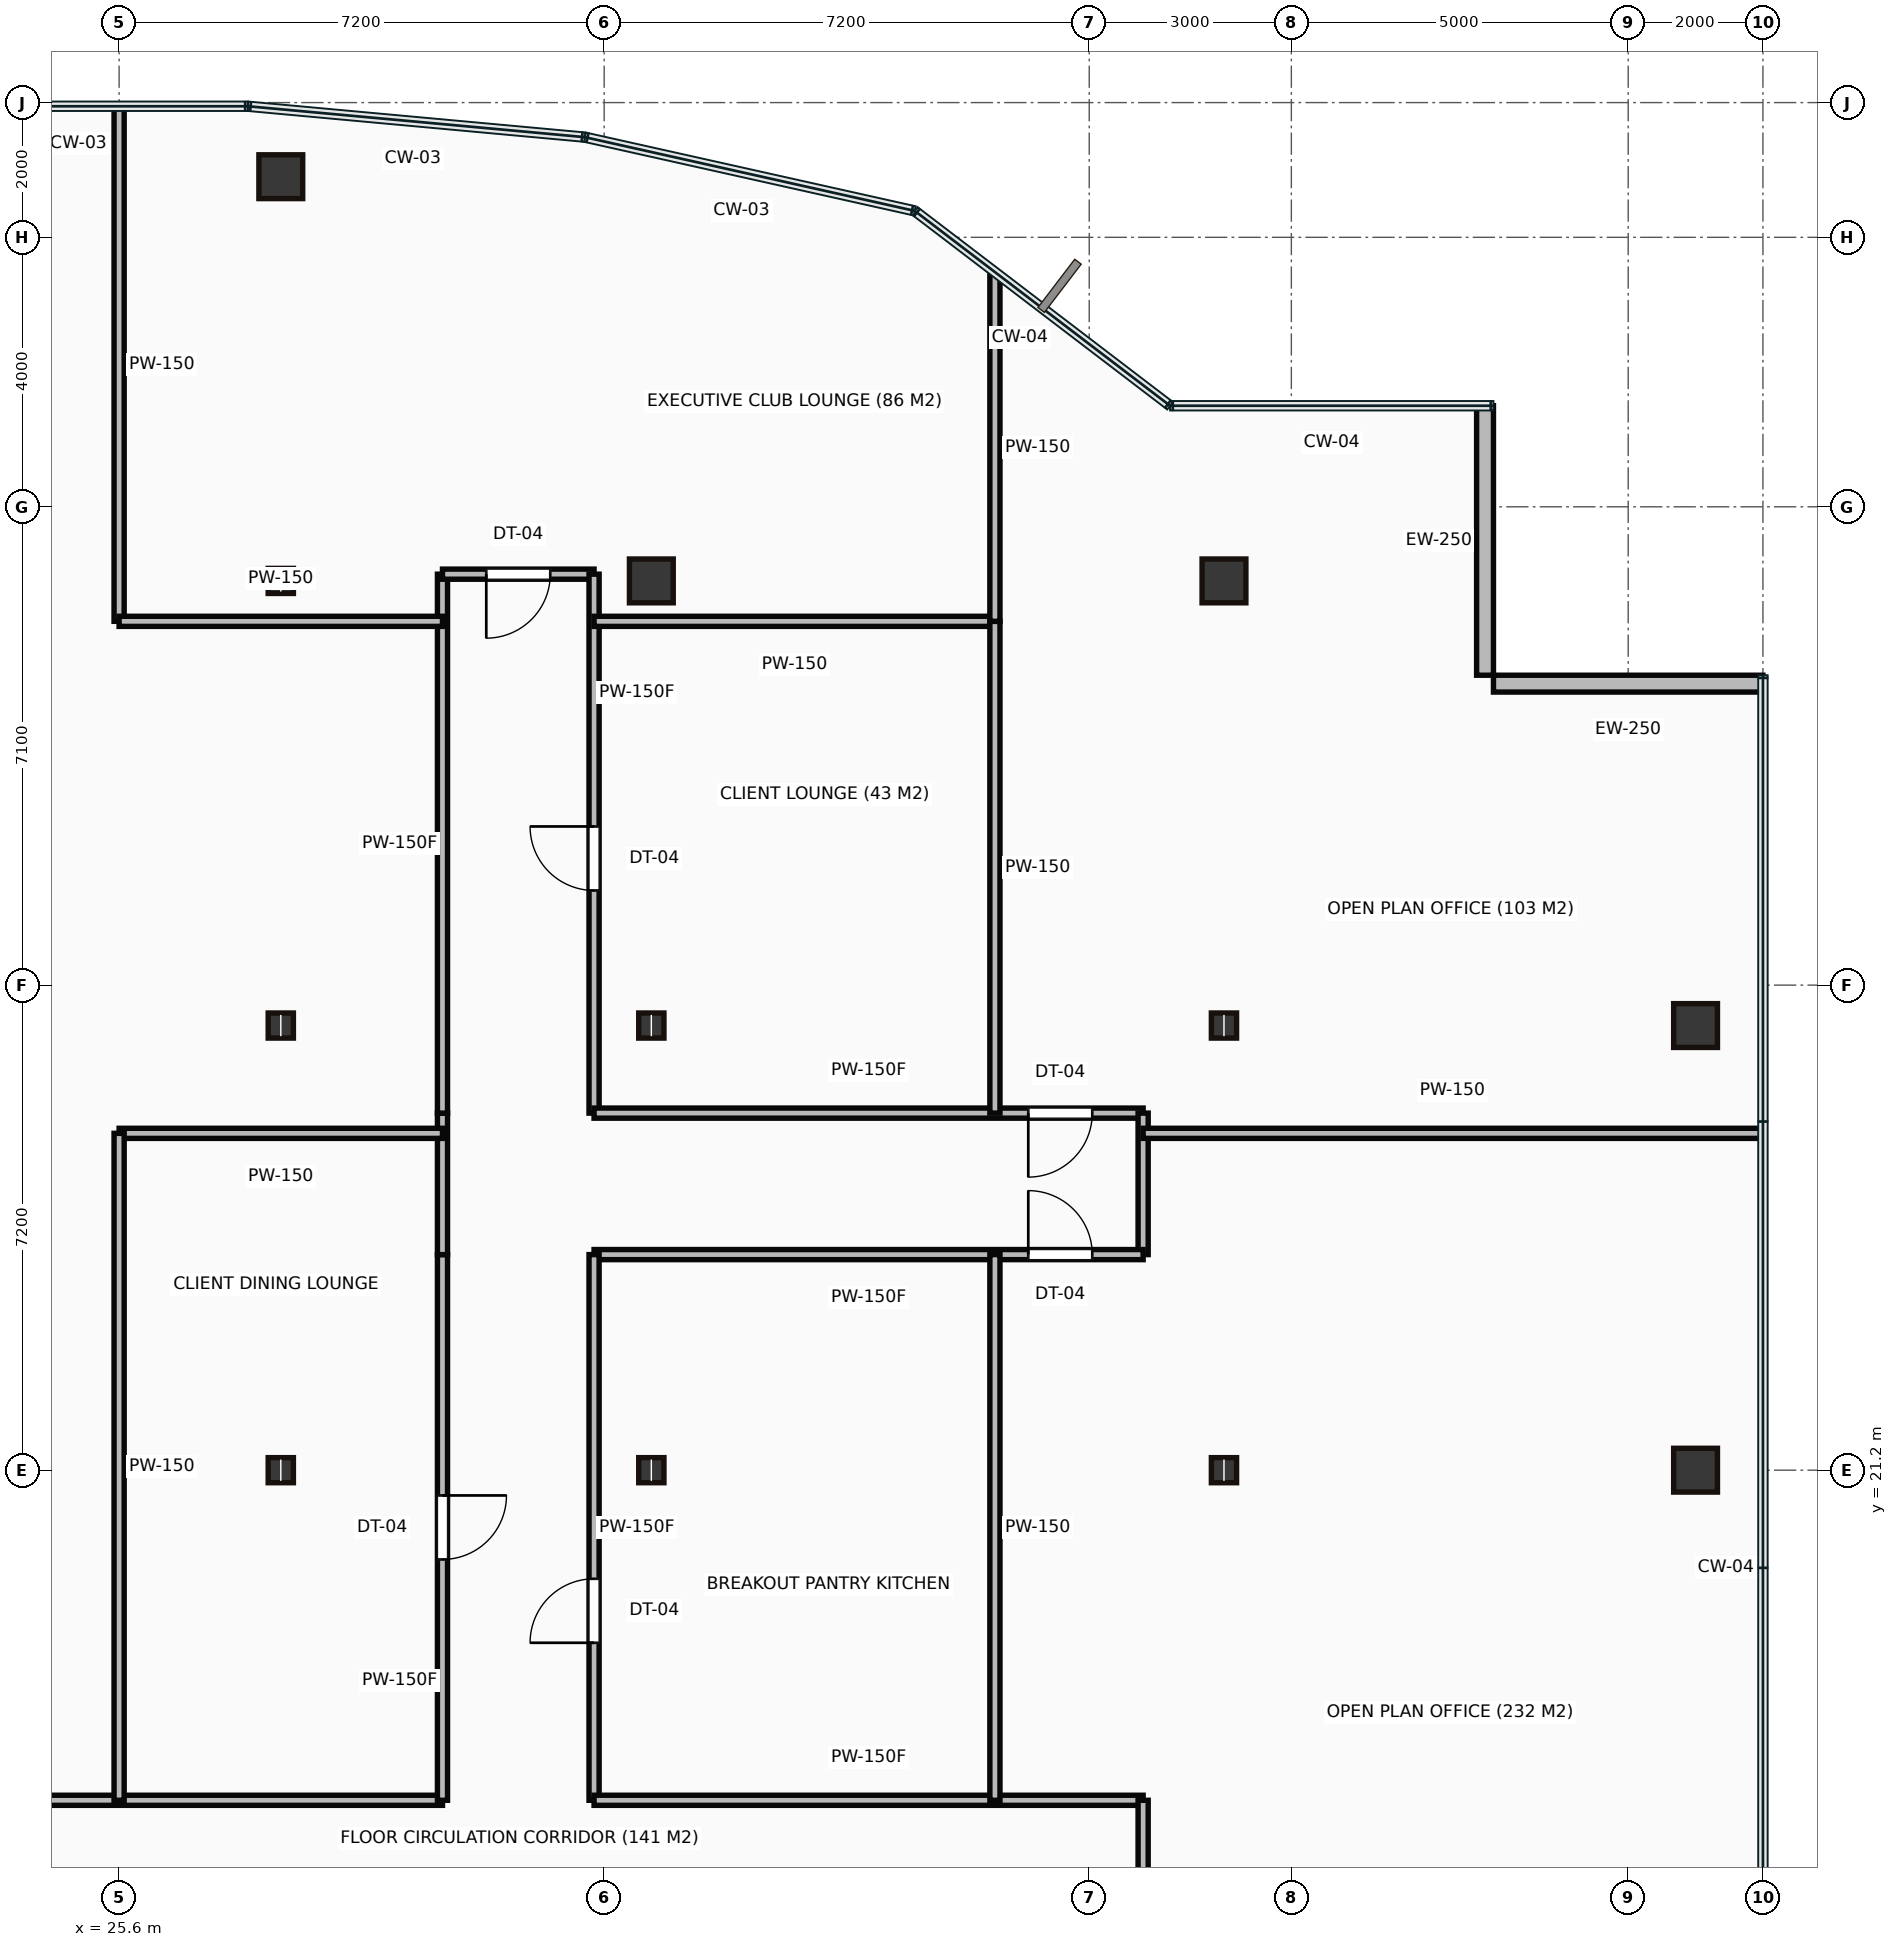
"""IFC4 building model, lengths in metres.
Left out: names, types, materials, properties, quantities, classifications, styles, units other than length and angle.
Written with IfcOpenShell. Run it as: python <this file> out.ifc"""

import sys

from ifc_helpers import new_model, si_unit, direction, frame, frame_2d, origin, origin_2d, place, context, subcontext, project, spatial, rectangle, hollow_rectangle, i_section, extrude, source, transform, mapped, element, fill, save


model = new_model("IFC4")
c1 = context("Model", 3, precision=1e-05, world=origin(), true_north=direction((0.0, 1.0)))
c2 = subcontext(c1, "Body", "Model", "MODEL_VIEW")
j1 = project(units=[si_unit("LENGTHUNIT", "METRE"), si_unit("PLANEANGLEUNIT", "RADIAN")], contexts=[c1])
p1 = place(None, origin())
s1 = spatial("IfcSite", under=j1, at=p1, CompositionType="ELEMENT")
p2 = place(p1, origin())
s2 = spatial("IfcBuilding", under=s1, at=p2, CompositionType="ELEMENT")
p3 = place(p2, frame((0.0, 0.0, 151.55)))
s3 = spatial("IfcBuildingStorey", under=s2, at=p3, CompositionType="ELEMENT", Elevation=151.55)
m1 = source(origin(), c2, "Body", "SweptSolid", [
    extrude(i_section(OverallWidth=0.374, OverallDepth=0.372, WebThickness=0.016, FlangeThickness=0.026, at=origin_2d()), origin(), (0.0, 0.0, 1.0), 3.65),
])
for number, where, z_axis, x_axis in (
    (1, (28.0, 21.2, 0.0), (0.0, 0.0, 1.0), (1.0, 0.0, 0.0)),
    (2, (28.0, 27.8, 0.0), (0.0, 0.0, 1.0), (1.0, 0.0, 0.0)),
    (3, (28.0, 34.4, 0.0), (0.0, 0.0, 1.0), (1.0, 0.0, 0.0)),
):
    element("IfcColumn", number, at=place(p3, frame(where, z_axis=z_axis, x_axis=x_axis)), inside=s3, PredefinedType="COLUMN", context=c2, shape_type="MappedRepresentation", body=[
        mapped(m1, transform((0.0, 0.0, 0.0))),
    ])
m2 = source(origin(), c2, "Body", "SweptSolid", [
    extrude(hollow_rectangle(XDim=0.65, YDim=0.65, WallThickness=0.032, at=origin_2d()), origin(), (0.0, 0.0, 1.0), 3.65),
])
p4 = place(p3, frame((28.0, 40.4, 0.0), z_axis=(0.0, 0.0, 1.0), x_axis=(1.0, 0.0, 0.0)))
e4 = element("IfcColumn", 4, at=p4, inside=s3, PredefinedType="COLUMN", context=c2, shape_type="MappedRepresentation", body=[
    mapped(m2, transform((0.0, 0.0, 0.0))),
])
for number, where, z_axis, x_axis in (
    (5, (33.5, 21.2, 0.0), (0.0, 0.0, 1.0), (1.0, 0.0, 0.0)),
    (6, (33.5, 27.8, 0.0), (0.0, 0.0, 1.0), (1.0, 0.0, 0.0)),
):
    element("IfcColumn", number, at=place(p3, frame(where, z_axis=z_axis, x_axis=x_axis)), inside=s3, PredefinedType="COLUMN", context=c2, shape_type="MappedRepresentation", body=[
        mapped(m1, transform((0.0, 0.0, 0.0))),
    ])
p5 = place(p3, frame((33.5, 34.4, 0.0), z_axis=(0.0, 0.0, 1.0), x_axis=(1.0, 0.0, 0.0)))
e7 = element("IfcColumn", 7, at=p5, inside=s3, PredefinedType="COLUMN", context=c2, shape_type="MappedRepresentation", body=[
    mapped(m2, transform((0.0, 0.0, 0.0))),
])
for number, where, z_axis, x_axis in (
    (8, (42.0, 21.2, 0.0), (0.0, 0.0, 1.0), (1.0, 0.0, 0.0)),
    (9, (42.0, 27.8, 0.0), (0.0, 0.0, 1.0), (1.0, 0.0, 0.0)),
):
    element("IfcColumn", number, at=place(p3, frame(where, z_axis=z_axis, x_axis=x_axis)), inside=s3, PredefinedType="COLUMN", context=c2, shape_type="MappedRepresentation", body=[
        mapped(m1, transform((0.0, 0.0, 0.0))),
    ])
for number, where, z_axis, x_axis in (
    (10, (42.0, 34.4, 0.0), (0.0, 0.0, 1.0), (1.0, 0.0, 0.0)),
    (11, (49.0, 21.2, 0.0), (0.0, 0.0, 1.0), (1.0, 0.0, 0.0)),
    (12, (49.0, 27.8, 0.0), (0.0, 0.0, 1.0), (1.0, 0.0, 0.0)),
):
    element("IfcColumn", number, at=place(p3, frame(where, z_axis=z_axis, x_axis=x_axis)), inside=s3, PredefinedType="COLUMN", context=c2, shape_type="MappedRepresentation", body=[
        mapped(m2, transform((0.0, 0.0, 0.0))),
    ])
m3 = source(origin(), c2, "Body", "SweptSolid", [
    extrude(rectangle(XDim=4.0, YDim=0.25, at=frame_2d((2.0, 0.0))), origin(), (0.0, 0.0, 1.0), 3.4),
])
for number, where, z_axis, x_axis in (
    (13, (50.0, 32.875, 0.0), (0.0, 0.0, 1.0), (-1.0, 0.0, 0.0)),
    (14, (45.875, 33.0, 0.0), (0.0, 0.0, 1.0), (0.0, 1.0, 0.0)),
):
    element("IfcWall", number, at=place(p3, frame(where, z_axis=z_axis, x_axis=x_axis)), inside=s3, PredefinedType="STANDARD", context=c2, shape_type="MappedRepresentation", body=[
        mapped(m3, transform((0.0, 0.0, 0.0))),
    ])
m4 = source(origin(), c2, "Body", "SweptSolid", [
    extrude(rectangle(XDim=25.8, YDim=0.15, at=frame_2d((12.9, 0.0))), origin(), (0.0, 0.0, 1.0), 3.4),
])
p6 = place(p3, frame((4.6, 16.3, 0.0), z_axis=(0.0, 0.0, 1.0), x_axis=(1.0, 0.0, 0.0)))
e15 = element("IfcWall", 15, at=p6, inside=s3, PredefinedType="PARTITIONING", context=c2, shape_type="MappedRepresentation", body=[
    mapped(m4, transform((0.0, 0.0, 0.0))),
])
p7 = place(p6, frame((3.555, 0.0, 0.0)))
e16 = element("IfcOpeningElement", 16, at=p7, cuts=e15, PredefinedType="OPENING", context=c2, shape_type="SweptSolid", body=[
    extrude(rectangle(XDim=0.95, YDim=2.15, at=frame_2d((0.475, 1.075))), frame((0.0, 0.085, 0.0), z_axis=(0.0, -1.0, 0.0), x_axis=(1.0, 0.0, 0.0)), (0.0, 0.0, 1.0), 0.17),
])
p8 = place(p6, frame((13.925, 0.0, 0.0)))
e17 = element("IfcOpeningElement", 17, at=p8, cuts=e15, PredefinedType="OPENING", context=c2, shape_type="SweptSolid", body=[
    extrude(rectangle(XDim=0.95, YDim=2.15, at=frame_2d((0.475, 1.075))), frame((0.0, 0.085, 0.0), z_axis=(0.0, -1.0, 0.0), x_axis=(1.0, 0.0, 0.0)), (0.0, 0.0, 1.0), 0.17),
])
m5 = source(origin(), c2, "Body", "SweptSolid", [
    extrude(rectangle(XDim=8.1, YDim=0.15, at=frame_2d((4.05, 0.0))), origin(), (0.0, 0.0, 1.0), 3.4),
])
p9 = place(p3, frame((30.4, 16.3, 0.0), z_axis=(0.0, 0.0, 1.0), x_axis=(0.0, 1.0, 0.0)))
e18 = element("IfcWall", 18, at=p9, inside=s3, PredefinedType="PARTITIONING", context=c2, shape_type="MappedRepresentation", body=[
    mapped(m5, transform((0.0, 0.0, 0.0))),
])
p10 = place(p9, frame((3.575, 0.0, 0.0)))
e19 = element("IfcOpeningElement", 19, at=p10, cuts=e18, PredefinedType="OPENING", context=c2, shape_type="SweptSolid", body=[
    extrude(rectangle(XDim=0.95, YDim=2.15, at=frame_2d((0.475, 1.075))), frame((0.0, 0.085, 0.0), z_axis=(0.0, -1.0, 0.0), x_axis=(1.0, 0.0, 0.0)), (0.0, 0.0, 1.0), 0.17),
])
m6 = source(origin(), c2, "Body", "SweptSolid", [
    extrude(rectangle(XDim=2.1, YDim=0.15, at=frame_2d((1.05, 0.0))), origin(), (0.0, 0.0, 1.0), 3.4),
])
p11 = place(p3, frame((30.4, 24.4, 0.0), z_axis=(0.0, 0.0, 1.0), x_axis=(0.0, 1.0, 0.0)))
e20 = element("IfcWall", 20, at=p11, inside=s3, PredefinedType="PARTITIONING", context=c2, shape_type="MappedRepresentation", body=[
    mapped(m6, transform((0.0, 0.0, 0.0))),
])
m7 = source(origin(), c2, "Body", "SweptSolid", [
    extrude(rectangle(XDim=8.0, YDim=0.15, at=frame_2d((4.0, 0.0))), origin(), (0.0, 0.0, 1.0), 3.4),
])
p12 = place(p3, frame((30.4, 26.5, 0.0), z_axis=(0.0, 0.0, 1.0), x_axis=(0.0, 1.0, 0.0)))
e21 = element("IfcWall", 21, at=p12, inside=s3, PredefinedType="PARTITIONING", context=c2, shape_type="MappedRepresentation", body=[
    mapped(m7, transform((0.0, 0.0, 0.0))),
])
m8 = source(origin(), c2, "Body", "SweptSolid", [
    extrude(rectangle(XDim=2.25, YDim=0.15, at=frame_2d((1.125, 0.0))), origin(), (0.0, 0.0, 1.0), 2.76),
])
p13 = place(p3, frame((30.4, 34.5, 0.0), z_axis=(0.0, 0.0, 1.0), x_axis=(1.0, 0.0, 0.0)))
e22 = element("IfcWall", 22, at=p13, inside=s3, PredefinedType="PARTITIONING", context=c2, shape_type="MappedRepresentation", body=[
    mapped(m8, transform((0.0, 0.0, 0.0))),
])
p14 = place(p13, frame((0.65, 0.0, 0.0)))
e23 = element("IfcOpeningElement", 23, at=p14, cuts=e22, PredefinedType="OPENING", context=c2, shape_type="SweptSolid", body=[
    extrude(rectangle(XDim=0.95, YDim=2.15, at=frame_2d((0.475, 1.075))), frame((0.0, 0.085, 0.0), z_axis=(0.0, -1.0, 0.0), x_axis=(1.0, 0.0, 0.0)), (0.0, 0.0, 1.0), 0.17),
])
p15 = place(p3, frame((32.65, 34.5, 0.0), z_axis=(0.0, 0.0, 1.0), x_axis=(0.0, -1.0, 0.0)))
e24 = element("IfcWall", 24, at=p15, inside=s3, PredefinedType="PARTITIONING", context=c2, shape_type="MappedRepresentation", body=[
    mapped(m7, transform((0.0, 0.0, 0.0))),
])
p16 = place(p15, frame((3.745, 0.0, 0.0)))
e25 = element("IfcOpeningElement", 25, at=p16, cuts=e24, PredefinedType="OPENING", context=c2, shape_type="SweptSolid", body=[
    extrude(rectangle(XDim=0.95, YDim=2.15, at=frame_2d((0.475, 1.075))), frame((0.0, 0.085, 0.0), z_axis=(0.0, -1.0, 0.0), x_axis=(1.0, 0.0, 0.0)), (0.0, 0.0, 1.0), 0.17),
])
m9 = source(origin(), c2, "Body", "SweptSolid", [
    extrude(rectangle(XDim=8.15, YDim=0.15, at=frame_2d((4.075, 0.0))), origin(), (0.0, 0.0, 1.0), 3.4),
])
p17 = place(p3, frame((32.65, 26.5, 0.0), z_axis=(0.0, 0.0, 1.0), x_axis=(1.0, 0.0, 0.0)))
e26 = element("IfcWall", 26, at=p17, inside=s3, PredefinedType="PARTITIONING", context=c2, shape_type="MappedRepresentation", body=[
    mapped(m9, transform((0.0, 0.0, 0.0))),
])
p18 = place(p17, frame((6.445, 0.0, 0.0)))
e27 = element("IfcOpeningElement", 27, at=p18, cuts=e26, PredefinedType="OPENING", context=c2, shape_type="SweptSolid", body=[
    extrude(rectangle(XDim=0.95, YDim=2.15, at=frame_2d((0.475, 1.075))), frame((0.0, 0.085, 0.0), z_axis=(0.0, -1.0, 0.0), x_axis=(1.0, 0.0, 0.0)), (0.0, 0.0, 1.0), 0.17),
])
p19 = place(p3, frame((40.8, 26.5, 0.0), z_axis=(0.0, 0.0, 1.0), x_axis=(0.0, -1.0, 0.0)))
e28 = element("IfcWall", 28, at=p19, inside=s3, PredefinedType="PARTITIONING", context=c2, shape_type="MappedRepresentation", body=[
    mapped(m6, transform((0.0, 0.0, 0.0))),
])
p20 = place(p3, frame((40.8, 24.4, 0.0), z_axis=(0.0, 0.0, 1.0), x_axis=(-1.0, 0.0, 0.0)))
e29 = element("IfcWall", 29, at=p20, inside=s3, PredefinedType="PARTITIONING", context=c2, shape_type="MappedRepresentation", body=[
    mapped(m9, transform((0.0, 0.0, 0.0))),
])
p21 = place(p20, frame((0.755, 0.0, 0.0)))
e30 = element("IfcOpeningElement", 30, at=p21, cuts=e29, PredefinedType="OPENING", context=c2, shape_type="SweptSolid", body=[
    extrude(rectangle(XDim=0.95, YDim=2.15, at=frame_2d((0.475, 1.075))), frame((0.0, 0.085, 0.0), z_axis=(0.0, -1.0, 0.0), x_axis=(1.0, 0.0, 0.0)), (0.0, 0.0, 1.0), 0.17),
])
p22 = place(p3, frame((32.65, 24.4, 0.0), z_axis=(0.0, 0.0, 1.0), x_axis=(0.0, -1.0, 0.0)))
e31 = element("IfcWall", 31, at=p22, inside=s3, PredefinedType="PARTITIONING", context=c2, shape_type="MappedRepresentation", body=[
    mapped(m5, transform((0.0, 0.0, 0.0))),
])
p23 = place(p22, frame((4.812, 0.0, 0.0)))
e32 = element("IfcOpeningElement", 32, at=p23, cuts=e31, PredefinedType="OPENING", context=c2, shape_type="SweptSolid", body=[
    extrude(rectangle(XDim=0.95, YDim=2.15, at=frame_2d((0.475, 1.075))), frame((0.0, 0.085, 0.0), z_axis=(0.0, -1.0, 0.0), x_axis=(1.0, 0.0, 0.0)), (0.0, 0.0, 1.0), 0.17),
])
p24 = place(p3, frame((32.65, 16.3, 0.0), z_axis=(0.0, 0.0, 1.0), x_axis=(1.0, 0.0, 0.0)))
e33 = element("IfcWall", 33, at=p24, inside=s3, PredefinedType="PARTITIONING", context=c2, shape_type="MappedRepresentation", body=[
    mapped(m9, transform((0.0, 0.0, 0.0))),
])
m10 = source(origin(), c2, "Body", "SweptSolid", [
    extrude(rectangle(XDim=2.3, YDim=0.15, at=frame_2d((1.15, 0.0))), origin(), (0.0, 0.0, 1.0), 3.4),
])
p25 = place(p3, frame((40.8, 16.3, 0.0), z_axis=(0.0, 0.0, 1.0), x_axis=(0.0, -1.0, 0.0)))
e34 = element("IfcWall", 34, at=p25, inside=s3, PredefinedType="PARTITIONING", context=c2, shape_type="MappedRepresentation", body=[
    mapped(m10, transform((0.0, 0.0, 0.0))),
])
m11 = source(origin(), c2, "Body", "SweptSolid", [
    extrude(rectangle(XDim=4.8, YDim=0.15, at=frame_2d((2.4, 0.0))), origin(), (0.0, 0.0, 1.0), 3.4),
])
p26 = place(p3, frame((30.4, 26.2, 0.0), z_axis=(0.0, 0.0, 1.0), x_axis=(-1.0, 0.0, 0.0)))
e35 = element("IfcWall", 35, at=p26, inside=s3, PredefinedType="PARTITIONING", context=c2, shape_type="MappedRepresentation", body=[
    mapped(m11, transform((0.0, 0.0, 0.0))),
])
m12 = source(origin(), c2, "Body", "SweptSolid", [
    extrude(rectangle(XDim=9.9, YDim=0.15, at=frame_2d((4.95, 0.0))), origin(), (0.0, 0.0, 1.0), 3.4),
])
p27 = place(p3, frame((25.6, 26.2, 0.0), z_axis=(0.0, 0.0, 1.0), x_axis=(0.0, -1.0, 0.0)))
e36 = element("IfcWall", 36, at=p27, inside=s3, PredefinedType="PARTITIONING", context=c2, shape_type="MappedRepresentation", body=[
    mapped(m12, transform((0.0, 0.0, 0.0))),
])
m13 = source(origin(), c2, "Body", "SweptSolid", [
    extrude(rectangle(XDim=7.625, YDim=0.15, at=frame_2d((3.813, 0.0))), origin(), (0.0, 0.0, 1.0), 3.4),
])
p28 = place(p3, frame((25.6, 41.426, 0.0), z_axis=(0.0, 0.0, 1.0), x_axis=(0.0, -1.0, 0.0)))
e37 = element("IfcWall", 37, at=p28, inside=s3, PredefinedType="PARTITIONING", context=c2, shape_type="MappedRepresentation", body=[
    mapped(m13, transform((0.0, 0.0, 0.0))),
])
p29 = place(p3, frame((25.6, 33.8, 0.0), z_axis=(0.0, 0.0, 1.0), x_axis=(1.0, 0.0, 0.0)))
e38 = element("IfcWall", 38, at=p29, inside=s3, PredefinedType="PARTITIONING", context=c2, shape_type="MappedRepresentation", body=[
    mapped(m11, transform((0.0, 0.0, 0.0))),
])
m14 = source(origin(), c2, "Body", "SweptSolid", [
    extrude(rectangle(XDim=5.95, YDim=0.15, at=frame_2d((2.975, 0.0))), origin(), (0.0, 0.0, 1.0), 3.4),
])
p30 = place(p3, frame((38.6, 33.8, 0.0), z_axis=(0.0, 0.0, 1.0), x_axis=(-1.0, 0.0, 0.0)))
e39 = element("IfcWall", 39, at=p30, inside=s3, PredefinedType="PARTITIONING", context=c2, shape_type="MappedRepresentation", body=[
    mapped(m14, transform((0.0, 0.0, 0.0))),
])
p31 = place(p3, frame((38.6, 24.4, 0.0), z_axis=(0.0, 0.0, 1.0), x_axis=(0.0, -1.0, 0.0)))
e40 = element("IfcWall", 40, at=p31, inside=s3, PredefinedType="PARTITIONING", context=c2, shape_type="MappedRepresentation", body=[
    mapped(m5, transform((0.0, 0.0, 0.0))),
])
m15 = source(origin(), c2, "Body", "SweptSolid", [
    extrude(rectangle(XDim=7.3, YDim=0.15, at=frame_2d((3.65, 0.0))), origin(), (0.0, 0.0, 1.0), 3.4),
])
p32 = place(p3, frame((38.6, 33.8, 0.0), z_axis=(0.0, 0.0, 1.0), x_axis=(0.0, -1.0, 0.0)))
e41 = element("IfcWall", 41, at=p32, inside=s3, PredefinedType="PARTITIONING", context=c2, shape_type="MappedRepresentation", body=[
    mapped(m15, transform((0.0, 0.0, 0.0))),
])
m16 = source(origin(), c2, "Body", "SweptSolid", [
    extrude(rectangle(XDim=5.159, YDim=0.15, at=frame_2d((2.58, 0.0))), origin(), (0.0, 0.0, 1.0), 3.4),
])
p33 = place(p3, frame((38.6, 38.959, 0.0), z_axis=(0.0, 0.0, 1.0), x_axis=(0.0, -1.0, 0.0)))
e42 = element("IfcWall", 42, at=p33, inside=s3, PredefinedType="PARTITIONING", context=c2, shape_type="MappedRepresentation", body=[
    mapped(m16, transform((0.0, 0.0, 0.0))),
])
m17 = source(origin(), c2, "Body", "SweptSolid", [
    extrude(rectangle(XDim=9.18, YDim=0.15, at=frame_2d((4.59, 0.0))), origin(), (0.0, 0.0, 1.0), 3.4),
])
p34 = place(p3, frame((40.8, 26.2, 0.0), z_axis=(0.0, 0.0, 1.0), x_axis=(1.0, 0.0, 0.0)))
e43 = element("IfcWall", 43, at=p34, inside=s3, PredefinedType="PARTITIONING", context=c2, shape_type="MappedRepresentation", body=[
    mapped(m17, transform((0.0, 0.0, 0.0))),
])
m18 = source(origin(), c2, "Body", "SweptSolid", [
    extrude(rectangle(XDim=0.95, YDim=2.15, at=frame_2d((0.475, 1.075))), frame((0.0, 0.025, 0.0), z_axis=(0.0, -1.0, 0.0), x_axis=(1.0, 0.0, 0.0)), (0.0, 0.0, 1.0), 0.05),
])
p35 = place(p10, origin())
e44 = element("IfcDoor", 44, at=p35, inside=s3, OperationType="SINGLE_SWING_RIGHT", PredefinedType="DOOR", context=c2, shape_type="MappedRepresentation", body=[
    mapped(m18, transform((0.0, 0.0, 0.0))),
])
fill(e19, e44)
p36 = place(p14, origin())
e45 = element("IfcDoor", 45, at=p36, inside=s3, OperationType="SINGLE_SWING_LEFT", PredefinedType="DOOR", context=c2, shape_type="MappedRepresentation", body=[
    mapped(m18, transform((0.0, 0.0, 0.0))),
])
fill(e23, e45)
p37 = place(p23, origin())
e46 = element("IfcDoor", 46, at=p37, inside=s3, OperationType="SINGLE_SWING_RIGHT", PredefinedType="DOOR", context=c2, shape_type="MappedRepresentation", body=[
    mapped(m18, transform((0.0, 0.0, 0.0))),
])
fill(e32, e46)
p38 = place(p16, origin())
e47 = element("IfcDoor", 47, at=p38, inside=s3, OperationType="SINGLE_SWING_LEFT", PredefinedType="DOOR", context=c2, shape_type="MappedRepresentation", body=[
    mapped(m18, transform((0.0, 0.0, 0.0))),
])
fill(e25, e47)
p39 = place(p21, origin())
e48 = element("IfcDoor", 48, at=p39, inside=s3, OperationType="SINGLE_SWING_RIGHT", PredefinedType="DOOR", context=c2, shape_type="MappedRepresentation", body=[
    mapped(m18, transform((0.0, 0.0, 0.0))),
])
fill(e30, e48)
p40 = place(p18, origin())
e49 = element("IfcDoor", 49, at=p40, inside=s3, OperationType="SINGLE_SWING_LEFT", PredefinedType="DOOR", context=c2, shape_type="MappedRepresentation", body=[
    mapped(m18, transform((0.0, 0.0, 0.0))),
])
fill(e27, e49)
save(model, sys.argv[1])
